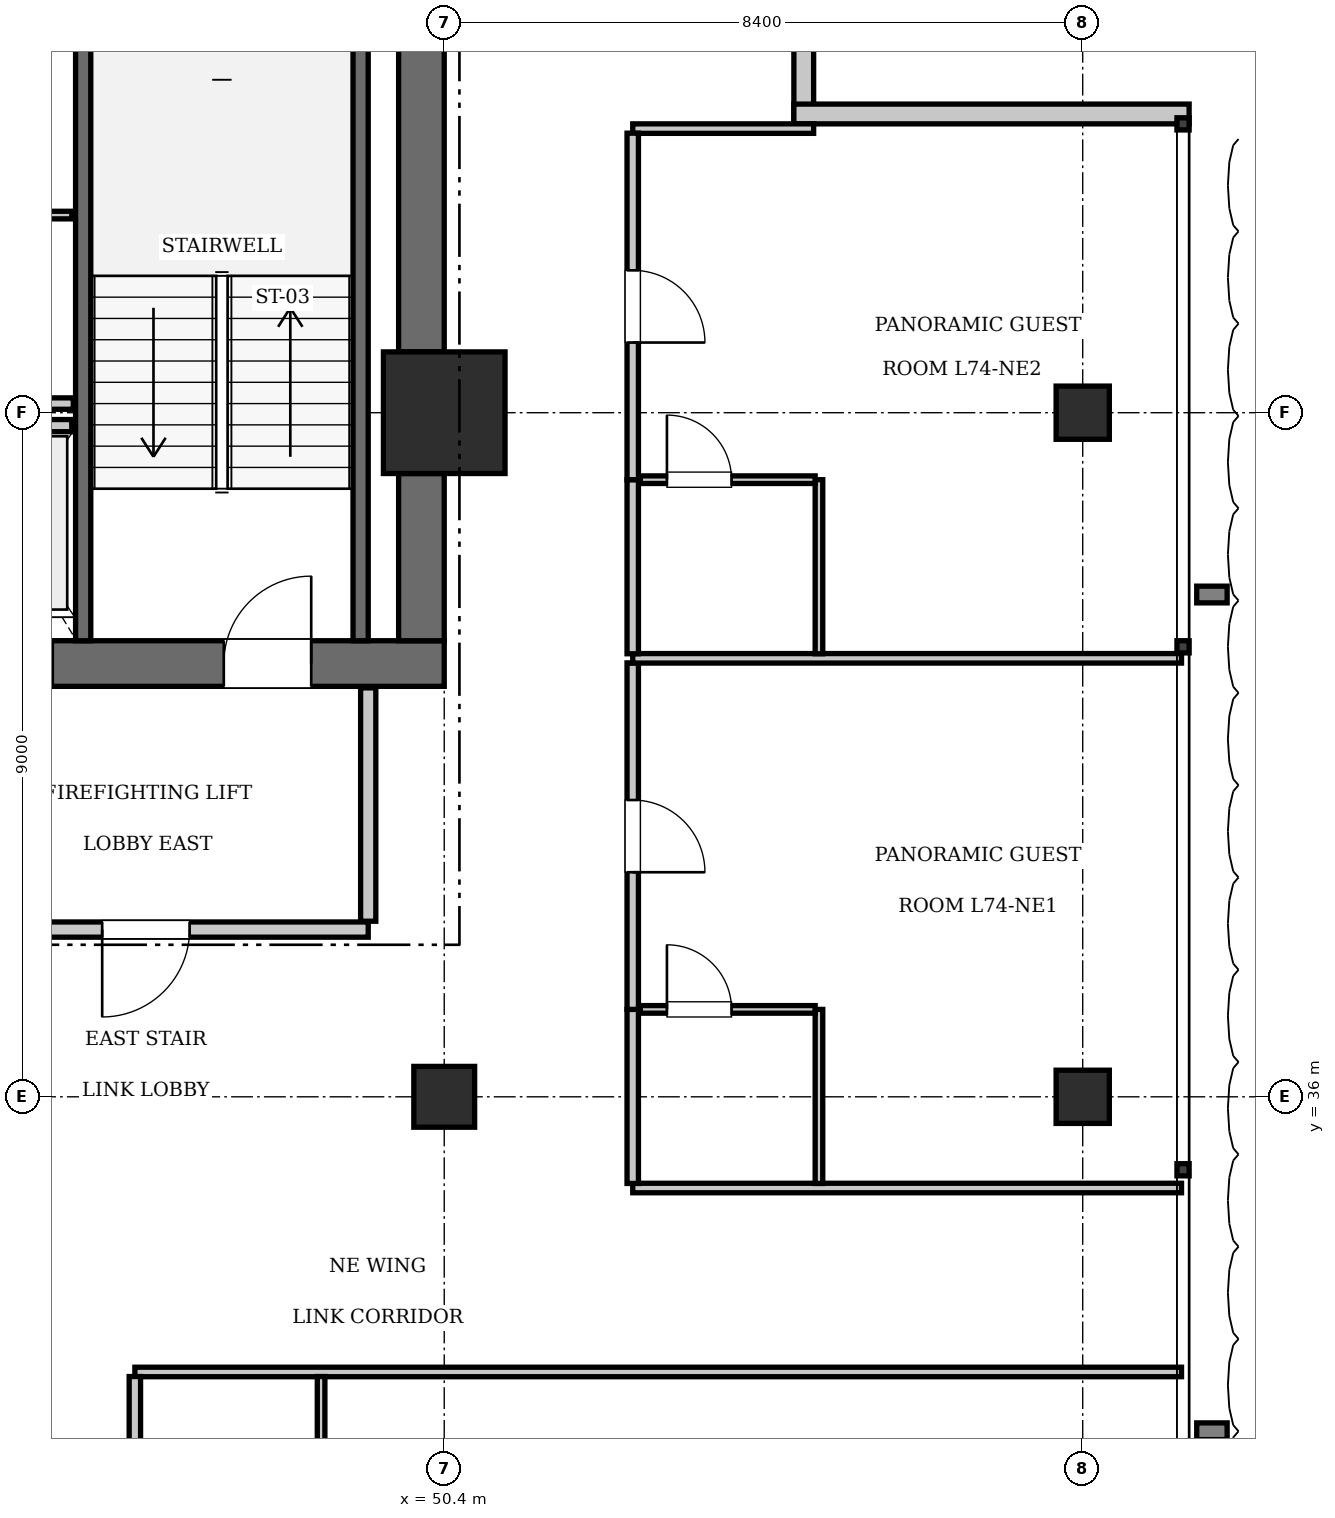
"""IFC4 building model, lengths in metres.
Left out: names, types, materials, properties, quantities, classifications, styles, units other than length and angle.
Written with IfcOpenShell. Run it as: python <this file> out.ifc"""

import sys

from ifc_helpers import new_model, si_unit, direction, frame, frame_2d, origin, origin_2d, place, context, subcontext, project, spatial, rectangle, extrude, element, fill, save


model = new_model("IFC4")
c1 = context("Model", 3, precision=1e-05, world=origin(), true_north=direction((0.0, 1.0)))
c2 = subcontext(c1, "Body", "Model", "MODEL_VIEW")
j1 = project(units=[si_unit("LENGTHUNIT", "METRE"), si_unit("PLANEANGLEUNIT", "RADIAN")], contexts=[c1])
p1 = place(None, origin())
s1 = spatial("IfcSite", under=j1, at=p1, CompositionType="ELEMENT")
p2 = place(p1, origin())
s2 = spatial("IfcBuilding", under=s1, at=p2, CompositionType="ELEMENT")
p3 = place(p2, frame((0.0, 0.0, 301.0)))
s3 = spatial("IfcBuildingStorey", under=s2, at=p3, CompositionType="ELEMENT", Elevation=301.0)
p4 = place(p3, frame((50.4, 45.0, 0.0), z_axis=(0.0, 0.0, 1.0), x_axis=(1.0, 0.0, 0.0)))
e1 = element("IfcColumn", 1, at=p4, inside=s3, PredefinedType="COLUMN", context=c2, shape_type="SweptSolid", body=[
    extrude(rectangle(XDim=1.6, YDim=1.6, at=origin_2d()), origin(), (0.0, 0.0, 1.0), 3.85),
])
p5 = place(p3, frame((43.6, 41.7, 0.0), z_axis=(0.0, 0.0, 1.0), x_axis=(1.0, 0.0, 0.0)))
e2 = element("IfcWall", 2, at=p5, inside=s3, PredefinedType="SHEAR", context=c2, shape_type="SweptSolid", body=[
    extrude(rectangle(XDim=6.8, YDim=0.6, at=frame_2d((3.4, 0.0))), origin(), (0.0, 0.0, 1.0), 3.85),
])
p6 = place(p5, frame((3.9, 0.0, 0.0)))
e3 = element("IfcOpeningElement", 3, at=p6, cuts=e2, PredefinedType="OPENING", context=c2, shape_type="SweptSolid", body=[
    extrude(rectangle(XDim=1.15, YDim=2.15, at=frame_2d((0.575, 1.075))), frame((0.0, 0.31, 0.0), z_axis=(0.0, -1.0, 0.0), x_axis=(1.0, 0.0, 0.0)), (0.0, 0.0, 1.0), 0.62),
])
p7 = place(p5, frame((0.55, 0.0, 0.0)))
e4 = element("IfcOpeningElement", 4, at=p7, cuts=e2, PredefinedType="OPENING", context=c2, shape_type="SweptSolid", body=[
    extrude(rectangle(XDim=1.1, YDim=2.2, at=frame_2d((0.55, 1.1))), frame((0.0, 0.31, 0.0), z_axis=(0.0, -1.0, 0.0), x_axis=(1.0, 0.0, 0.0)), (0.0, 0.0, 1.0), 0.62),
])
p8 = place(p3, frame((50.1, 42.0, 0.0), z_axis=(0.0, 0.0, 1.0), x_axis=(0.0, 1.0, 0.0)))
e5 = element("IfcWall", 5, at=p8, inside=s3, PredefinedType="SHEAR", context=c2, shape_type="SweptSolid", body=[
    extrude(rectangle(XDim=2.2, YDim=0.6, at=frame_2d((1.1, 0.0))), origin(), (0.0, 0.0, 1.0), 3.85),
])
p9 = place(p3, frame((50.1, 45.8, 0.0), z_axis=(0.0, 0.0, 1.0), x_axis=(0.0, 1.0, 0.0)))
e6 = element("IfcWall", 6, at=p9, inside=s3, PredefinedType="SHEAR", context=c2, shape_type="SweptSolid", body=[
    extrude(rectangle(XDim=7.6, YDim=0.6, at=frame_2d((3.8, 0.0))), origin(), (0.0, 0.0, 1.0), 3.85),
])
p10 = place(p3, frame((50.4, 36.0, 0.0), z_axis=(0.0, 0.0, 1.0), x_axis=(1.0, 0.0, 0.0)))
e7 = element("IfcColumn", 7, at=p10, inside=s3, PredefinedType="COLUMN", context=c2, shape_type="SweptSolid", body=[
    extrude(rectangle(XDim=0.8, YDim=0.8, at=origin_2d()), origin(), (0.0, 0.0, 1.0), 3.85),
])
for number, where, z_axis, x_axis in (
    (8, (58.8, 36.0, 0.0), (0.0, 0.0, 1.0), (1.0, 0.0, 0.0)),
    (9, (58.8, 45.0, 0.0), (0.0, 0.0, 1.0), (1.0, 0.0, 0.0)),
):
    element("IfcColumn", number, at=place(p3, frame(where, z_axis=z_axis, x_axis=x_axis)), inside=s3, PredefinedType="COLUMN", context=c2, shape_type="SweptSolid", body=[
        extrude(rectangle(XDim=0.7, YDim=0.7, at=origin_2d()), origin(), (0.0, 0.0, 1.0), 3.85),
    ])
p11 = place(p3, frame((45.65, 42.0, 0.0), z_axis=(0.0, 0.0, 1.0), x_axis=(0.0, 1.0, 0.0)))
e10 = element("IfcWall", 10, at=p11, inside=s3, PredefinedType="SOLIDWALL", context=c2, shape_type="SweptSolid", body=[
    extrude(rectangle(XDim=9.15, YDim=0.2, at=frame_2d((4.575, 0.0))), origin(), (0.0, 0.0, 1.0), 3.61),
])
p12 = place(p3, frame((49.3, 42.0, 0.0), z_axis=(0.0, 0.0, 1.0), x_axis=(0.0, 1.0, 0.0)))
e11 = element("IfcWall", 11, at=p12, inside=s3, PredefinedType="SOLIDWALL", context=c2, shape_type="SweptSolid", body=[
    extrude(rectangle(XDim=9.12, YDim=0.2, at=frame_2d((4.56, 0.0))), origin(), (0.0, 0.0, 1.0), 3.61),
])
p13 = place(p3, frame((43.9, 44.83, 0.0), z_axis=(0.0, 0.0, 1.0), x_axis=(1.0, 0.0, 0.0)))
e12 = element("IfcWall", 12, at=p13, inside=s3, PredefinedType="SOLIDWALL", context=c2, shape_type="SweptSolid", body=[
    extrude(rectangle(XDim=1.6, YDim=0.16, at=frame_2d((0.8, 0.0))), origin(), (0.0, 0.0, 1.0), 3.61),
])
for number, where, z_axis, x_axis in (
    (13, (55.13, 54.0, 0.0), (0.0, 0.0, 1.0), (0.0, -1.0, 0.0)),
    (14, (55.0, 48.93, 0.0), (0.0, 0.0, 1.0), (1.0, 0.0, 0.0)),
):
    element("IfcWall", number, at=place(p3, frame(where, z_axis=z_axis, x_axis=x_axis)), inside=s3, PredefinedType="SOLIDWALL", context=c2, shape_type="SweptSolid", body=[
        extrude(rectangle(XDim=5.2, YDim=0.26, at=frame_2d((2.6, 0.0))), origin(), (0.0, 0.0, 1.0), 3.61),
    ])
p14 = place(p3, frame((43.6, 38.2, 0.0), z_axis=(0.0, 0.0, 1.0), x_axis=(1.0, 0.0, 0.0)))
e15 = element("IfcWall", 15, at=p14, inside=s3, PredefinedType="PARTITIONING", context=c2, shape_type="SweptSolid", body=[
    extrude(rectangle(XDim=5.8, YDim=0.2, at=frame_2d((2.9, 0.0))), origin(), (0.0, 0.0, 1.0), 3.61),
])
p15 = place(p14, frame((2.3, 0.0, 0.0)))
e16 = element("IfcOpeningElement", 16, at=p15, cuts=e15, PredefinedType="OPENING", context=c2, shape_type="SweptSolid", body=[
    extrude(rectangle(XDim=1.15, YDim=2.15, at=frame_2d((0.575, 1.075))), frame((0.0, 0.11, 0.0), z_axis=(0.0, -1.0, 0.0), x_axis=(1.0, 0.0, 0.0)), (0.0, 0.0, 1.0), 0.22),
])
p16 = place(p3, frame((49.4, 38.31, 0.0), z_axis=(0.0, 0.0, 1.0), x_axis=(0.0, 1.0, 0.0)))
e17 = element("IfcWall", 17, at=p16, inside=s3, PredefinedType="PARTITIONING", context=c2, shape_type="SweptSolid", body=[
    extrude(rectangle(XDim=3.07, YDim=0.2, at=frame_2d((1.535, 0.0))), origin(), (0.0, 0.0, 1.0), 3.61),
])
p17 = place(p3, frame((42.4, 47.6, 0.0), z_axis=(0.0, 0.0, 1.0), x_axis=(1.0, 0.0, 0.0)))
e18 = element("IfcWall", 18, at=p17, inside=s3, PredefinedType="PARTITIONING", context=c2, shape_type="SweptSolid", body=[
    extrude(rectangle(XDim=3.1, YDim=0.1, at=frame_2d((1.55, 0.0))), origin(), (0.0, 0.0, 1.0), 3.61),
])
p18 = place(p3, frame((42.38, 45.12, 0.0), z_axis=(0.0, 0.0, 1.0), x_axis=(1.0, 0.0, 0.0)))
e19 = element("IfcWall", 19, at=p18, inside=s3, PredefinedType="PARTITIONING", context=c2, shape_type="SweptSolid", body=[
    extrude(rectangle(XDim=3.14, YDim=0.15, at=frame_2d((1.57, 0.0))), origin(), (0.0, 0.0, 1.0), 3.61),
])
p19 = place(p3, frame((46.33, 32.38, 0.0), z_axis=(0.0, 0.0, 1.0), x_axis=(1.0, 0.0, 0.0)))
e20 = element("IfcWall", 20, at=p19, inside=s3, PredefinedType="PARTITIONING", context=c2, shape_type="SweptSolid", body=[
    extrude(rectangle(XDim=13.77, YDim=0.125, at=frame_2d((6.885, 0.0))), origin(), (0.0, 0.0, 1.0), 3.61),
])
p20 = place(p3, frame((46.33, 30.43, 0.0), z_axis=(0.0, 0.0, 1.0), x_axis=(0.0, 1.0, 0.0)))
e21 = element("IfcWall", 21, at=p20, inside=s3, PredefinedType="PARTITIONING", context=c2, shape_type="SweptSolid", body=[
    extrude(rectangle(XDim=1.89, YDim=0.15, at=frame_2d((0.945, 0.0))), origin(), (0.0, 0.0, 1.0), 3.61),
])
p21 = place(p3, frame((48.78, 30.43, 0.0), z_axis=(0.0, 0.0, 1.0), x_axis=(0.0, 1.0, 0.0)))
e22 = element("IfcWall", 22, at=p21, inside=s3, PredefinedType="PARTITIONING", context=c2, shape_type="SweptSolid", body=[
    extrude(rectangle(XDim=1.89, YDim=0.1, at=frame_2d((0.945, 0.0))), origin(), (0.0, 0.0, 1.0), 3.61),
])
p22 = place(p3, frame((52.88, 34.8, 0.0), z_axis=(0.0, 0.0, 1.0), x_axis=(1.0, 0.0, 0.0)))
e23 = element("IfcWall", 23, at=p22, inside=s3, PredefinedType="PARTITIONING", context=c2, shape_type="SweptSolid", body=[
    extrude(rectangle(XDim=7.22, YDim=0.125, at=frame_2d((3.61, 0.0))), origin(), (0.0, 0.0, 1.0), 3.61),
])
p23 = place(p3, frame((52.88, 48.738, 0.0), z_axis=(0.0, 0.0, 1.0), x_axis=(1.0, 0.0, 0.0)))
e24 = element("IfcWall", 24, at=p23, inside=s3, PredefinedType="PARTITIONING", context=c2, shape_type="SweptSolid", body=[
    extrude(rectangle(XDim=2.38, YDim=0.125, at=frame_2d((1.19, 0.0))), origin(), (0.0, 0.0, 1.0), 3.61),
])
p24 = place(p3, frame((52.88, 34.86, 0.0), z_axis=(0.0, 0.0, 1.0), x_axis=(0.0, 1.0, 0.0)))
e25 = element("IfcWall", 25, at=p24, inside=s3, PredefinedType="PARTITIONING", context=c2, shape_type="SweptSolid", body=[
    extrude(rectangle(XDim=2.29, YDim=0.15, at=frame_2d((1.145, 0.0))), origin(), (0.0, 0.0, 1.0), 3.61),
])
p25 = place(p3, frame((52.88, 37.15, 0.0), z_axis=(0.0, 0.0, 1.0), x_axis=(0.0, 1.0, 0.0)))
e26 = element("IfcWall", 26, at=p25, inside=s3, PredefinedType="PARTITIONING", context=c2, shape_type="SweptSolid", body=[
    extrude(rectangle(XDim=4.559, YDim=0.15, at=frame_2d((2.279, 0.0))), origin(), (0.0, 0.0, 1.0), 3.61),
])
p26 = place(p25, frame((1.804, 0.0, 0.0)))
e27 = element("IfcOpeningElement", 27, at=p26, cuts=e26, PredefinedType="OPENING", context=c2, shape_type="SweptSolid", body=[
    extrude(rectangle(XDim=0.95, YDim=2.15, at=frame_2d((0.475, 1.075))), frame((0.0, 0.085, 0.0), z_axis=(0.0, -1.0, 0.0), x_axis=(1.0, 0.0, 0.0)), (0.0, 0.0, 1.0), 0.17),
])
p27 = place(p3, frame((55.33, 34.86, 0.0), z_axis=(0.0, 0.0, 1.0), x_axis=(0.0, 1.0, 0.0)))
e28 = element("IfcWall", 28, at=p27, inside=s3, PredefinedType="PARTITIONING", context=c2, shape_type="SweptSolid", body=[
    extrude(rectangle(XDim=2.29, YDim=0.1, at=frame_2d((1.145, 0.0))), origin(), (0.0, 0.0, 1.0), 3.61),
])
p28 = place(p3, frame((52.98, 37.15, 0.0), z_axis=(0.0, 0.0, 1.0), x_axis=(1.0, 0.0, 0.0)))
e29 = element("IfcWall", 29, at=p28, inside=s3, PredefinedType="PARTITIONING", context=c2, shape_type="SweptSolid", body=[
    extrude(rectangle(XDim=2.3, YDim=0.1, at=frame_2d((1.15, 0.0))), origin(), (0.0, 0.0, 1.0), 3.61),
])
p29 = place(p28, frame((0.35, 0.0, 0.0)))
e30 = element("IfcOpeningElement", 30, at=p29, cuts=e29, PredefinedType="OPENING", context=c2, shape_type="SweptSolid", body=[
    extrude(rectangle(XDim=0.85, YDim=2.1, at=frame_2d((0.425, 1.05))), frame((0.0, 0.06, 0.0), z_axis=(0.0, -1.0, 0.0), x_axis=(1.0, 0.0, 0.0)), (0.0, 0.0, 1.0), 0.12),
])
p30 = place(p3, frame((52.88, 41.769, 0.0), z_axis=(0.0, 0.0, 1.0), x_axis=(1.0, 0.0, 0.0)))
e31 = element("IfcWall", 31, at=p30, inside=s3, PredefinedType="PARTITIONING", context=c2, shape_type="SweptSolid", body=[
    extrude(rectangle(XDim=7.22, YDim=0.125, at=frame_2d((3.61, 0.0))), origin(), (0.0, 0.0, 1.0), 3.61),
])
p31 = place(p3, frame((52.88, 41.829, 0.0), z_axis=(0.0, 0.0, 1.0), x_axis=(0.0, 1.0, 0.0)))
e32 = element("IfcWall", 32, at=p31, inside=s3, PredefinedType="PARTITIONING", context=c2, shape_type="SweptSolid", body=[
    extrude(rectangle(XDim=2.29, YDim=0.15, at=frame_2d((1.145, 0.0))), origin(), (0.0, 0.0, 1.0), 3.61),
])
p32 = place(p3, frame((52.88, 44.119, 0.0), z_axis=(0.0, 0.0, 1.0), x_axis=(0.0, 1.0, 0.0)))
e33 = element("IfcWall", 33, at=p32, inside=s3, PredefinedType="PARTITIONING", context=c2, shape_type="SweptSolid", body=[
    extrude(rectangle(XDim=4.559, YDim=0.15, at=frame_2d((2.279, 0.0))), origin(), (0.0, 0.0, 1.0), 3.61),
])
p33 = place(p32, frame((1.804, 0.0, 0.0)))
e34 = element("IfcOpeningElement", 34, at=p33, cuts=e33, PredefinedType="OPENING", context=c2, shape_type="SweptSolid", body=[
    extrude(rectangle(XDim=0.95, YDim=2.15, at=frame_2d((0.475, 1.075))), frame((0.0, 0.085, 0.0), z_axis=(0.0, -1.0, 0.0), x_axis=(1.0, 0.0, 0.0)), (0.0, 0.0, 1.0), 0.17),
])
p34 = place(p3, frame((55.33, 41.829, 0.0), z_axis=(0.0, 0.0, 1.0), x_axis=(0.0, 1.0, 0.0)))
e35 = element("IfcWall", 35, at=p34, inside=s3, PredefinedType="PARTITIONING", context=c2, shape_type="SweptSolid", body=[
    extrude(rectangle(XDim=2.29, YDim=0.1, at=frame_2d((1.145, 0.0))), origin(), (0.0, 0.0, 1.0), 3.61),
])
p35 = place(p3, frame((52.98, 44.119, 0.0), z_axis=(0.0, 0.0, 1.0), x_axis=(1.0, 0.0, 0.0)))
e36 = element("IfcWall", 36, at=p35, inside=s3, PredefinedType="PARTITIONING", context=c2, shape_type="SweptSolid", body=[
    extrude(rectangle(XDim=2.3, YDim=0.1, at=frame_2d((1.15, 0.0))), origin(), (0.0, 0.0, 1.0), 3.61),
])
p36 = place(p35, frame((0.35, 0.0, 0.0)))
e37 = element("IfcOpeningElement", 37, at=p36, cuts=e36, PredefinedType="OPENING", context=c2, shape_type="SweptSolid", body=[
    extrude(rectangle(XDim=0.85, YDim=2.1, at=frame_2d((0.425, 1.05))), frame((0.0, 0.06, 0.0), z_axis=(0.0, -1.0, 0.0), x_axis=(1.0, 0.0, 0.0)), (0.0, 0.0, 1.0), 0.12),
])
p37 = place(p6, origin())
e38 = element("IfcDoor", 38, at=p37, inside=s3, OperationType="SINGLE_SWING_RIGHT", PredefinedType="DOOR", context=c2, shape_type="SweptSolid", body=[
    extrude(rectangle(XDim=1.15, YDim=2.15, at=frame_2d((0.575, 1.075))), frame((0.0, 0.025, 0.0), z_axis=(0.0, -1.0, 0.0), x_axis=(1.0, 0.0, 0.0)), (0.0, 0.0, 1.0), 0.05),
])
fill(e3, e38)
p38 = place(p7, frame((1.1, 0.0, 0.0), z_axis=(0.0, 0.0, 1.0), x_axis=(-1.0, 0.0, 0.0)))
e39 = element("IfcDoor", 39, at=p38, inside=s3, OperationType="SLIDING_TO_LEFT", PredefinedType="DOOR", context=c2, shape_type="SweptSolid", body=[
    extrude(rectangle(XDim=1.1, YDim=2.2, at=frame_2d((0.55, 1.1))), frame((0.0, 0.025, 0.0), z_axis=(0.0, -1.0, 0.0), x_axis=(1.0, 0.0, 0.0)), (0.0, 0.0, 1.0), 0.05),
])
fill(e4, e39)
p39 = place(p15, frame((1.15, 0.0, 0.0), z_axis=(0.0, 0.0, 1.0), x_axis=(-1.0, 0.0, 0.0)))
e40 = element("IfcDoor", 40, at=p39, inside=s3, OperationType="SINGLE_SWING_RIGHT", PredefinedType="DOOR", context=c2, shape_type="SweptSolid", body=[
    extrude(rectangle(XDim=1.15, YDim=2.15, at=frame_2d((0.575, 1.075))), frame((0.0, 0.025, 0.0), z_axis=(0.0, -1.0, 0.0), x_axis=(1.0, 0.0, 0.0)), (0.0, 0.0, 1.0), 0.05),
])
fill(e16, e40)
p40 = place(p29, origin())
e41 = element("IfcDoor", 41, at=p40, inside=s3, OperationType="SINGLE_SWING_LEFT", PredefinedType="DOOR", context=c2, shape_type="SweptSolid", body=[
    extrude(rectangle(XDim=0.85, YDim=2.1, at=frame_2d((0.425, 1.05))), frame((0.0, 0.025, 0.0), z_axis=(0.0, -1.0, 0.0), x_axis=(1.0, 0.0, 0.0)), (0.0, 0.0, 1.0), 0.05),
])
fill(e30, e41)
p41 = place(p26, frame((0.95, 0.0, 0.0), z_axis=(0.0, 0.0, 1.0), x_axis=(-1.0, 0.0, 0.0)))
e42 = element("IfcDoor", 42, at=p41, inside=s3, OperationType="SINGLE_SWING_RIGHT", PredefinedType="DOOR", context=c2, shape_type="SweptSolid", body=[
    extrude(rectangle(XDim=0.95, YDim=2.15, at=frame_2d((0.475, 1.075))), frame((0.0, 0.025, 0.0), z_axis=(0.0, -1.0, 0.0), x_axis=(1.0, 0.0, 0.0)), (0.0, 0.0, 1.0), 0.05),
])
fill(e27, e42)
p42 = place(p36, origin())
e43 = element("IfcDoor", 43, at=p42, inside=s3, OperationType="SINGLE_SWING_LEFT", PredefinedType="DOOR", context=c2, shape_type="SweptSolid", body=[
    extrude(rectangle(XDim=0.85, YDim=2.1, at=frame_2d((0.425, 1.05))), frame((0.0, 0.025, 0.0), z_axis=(0.0, -1.0, 0.0), x_axis=(1.0, 0.0, 0.0)), (0.0, 0.0, 1.0), 0.05),
])
fill(e37, e43)
p43 = place(p33, frame((0.95, 0.0, 0.0), z_axis=(0.0, 0.0, 1.0), x_axis=(-1.0, 0.0, 0.0)))
e44 = element("IfcDoor", 44, at=p43, inside=s3, OperationType="SINGLE_SWING_RIGHT", PredefinedType="DOOR", context=c2, shape_type="SweptSolid", body=[
    extrude(rectangle(XDim=0.95, YDim=2.15, at=frame_2d((0.475, 1.075))), frame((0.0, 0.025, 0.0), z_axis=(0.0, -1.0, 0.0), x_axis=(1.0, 0.0, 0.0)), (0.0, 0.0, 1.0), 0.05),
])
fill(e34, e44)
save(model, sys.argv[1])
